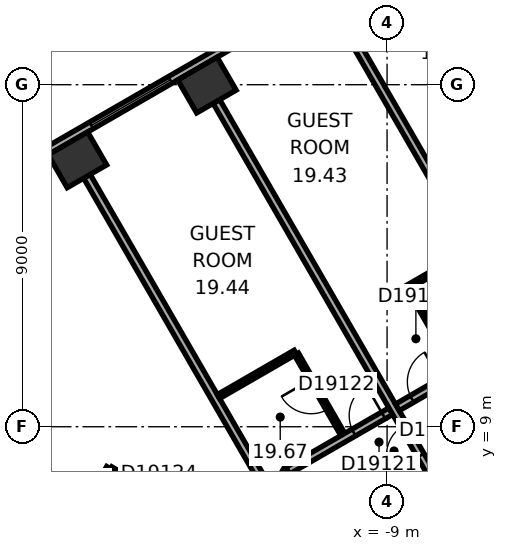
"""IFC4 building model, lengths in metres.
Left out: names, types, materials, properties, quantities, classifications, styles, units other than length and angle.
Written with IfcOpenShell. Run it as: python <this file> out.ifc"""

import sys

from ifc_helpers import new_model, si_unit, direction, frame, frame_2d, origin, origin_2d, place, context, subcontext, project, spatial, rectangle, extrude, element, fill, save


model = new_model("IFC4")
c1 = context("Model", 3, precision=1e-05, world=origin(), true_north=direction((0.0, 1.0)))
c2 = subcontext(c1, "Body", "Model", "MODEL_VIEW")
j1 = project(units=[si_unit("LENGTHUNIT", "METRE"), si_unit("PLANEANGLEUNIT", "RADIAN")], contexts=[c1])
p1 = place(None, origin())
s1 = spatial("IfcSite", under=j1, at=p1, CompositionType="ELEMENT")
p2 = place(p1, origin())
s2 = spatial("IfcBuilding", under=s1, at=p2, CompositionType="ELEMENT")
p3 = place(p2, frame((0.0, 0.0, 86.9)))
s3 = spatial("IfcBuildingStorey", under=s2, at=p3, CompositionType="ELEMENT", Elevation=86.9)
for number, where, z_axis, x_axis in (
    (1, (-13.74, 17.99, 0.0), (0.0, 0.0, 1.0), (-0.866, -0.5, 0.0)),
    (2, (-17.148, 16.023, 0.0), (0.0, 0.0, 1.0), (-0.866, -0.5, 0.0)),
):
    element("IfcColumn", number, at=place(p3, frame(where, z_axis=z_axis, x_axis=x_axis)), inside=s3, PredefinedType="COLUMN", context=c2, shape_type="SweptSolid", body=[
        extrude(rectangle(XDim=1.2, YDim=1.0, at=origin_2d()), origin(), (0.0, 0.0, 1.0), 3.3),
    ])
p4 = place(p3, frame((0.3, 11.836, 0.0), z_axis=(0.0, 0.0, 1.0), x_axis=(-0.866021384402, -0.500006961711, 0.0)))
e3 = element("IfcWall", 3, at=p4, inside=s3, PredefinedType="SHEAR", context=c2, shape_type="SweptSolid", body=[
    extrude(rectangle(XDim=12.355, YDim=1.2, at=frame_2d((6.178, 0.0))), origin(), (0.0, 0.0, 1.0), 3.3),
])
p5 = place(p4, frame((6.378, 0.0, 0.0)))
e4 = element("IfcOpeningElement", 4, at=p5, cuts=e3, PredefinedType="OPENING", context=c2, shape_type="SweptSolid", body=[
    extrude(rectangle(XDim=1.5, YDim=2.1, at=frame_2d((0.75, 1.05))), frame((0.0, 0.61, 0.0), z_axis=(0.0, -1.0, 0.0), x_axis=(1.0, 0.0, 0.0)), (0.0, 0.0, 1.0), 1.22),
])
p6 = place(p4, frame((1.828, 0.0, 0.0)))
e5 = element("IfcOpeningElement", 5, at=p6, cuts=e3, PredefinedType="OPENING", context=c2, shape_type="SweptSolid", body=[
    extrude(rectangle(XDim=1.1, YDim=2.1, at=frame_2d((0.55, 1.05))), frame((0.0, 0.61, 0.0), z_axis=(0.0, -1.0, 0.0), x_axis=(1.0, 0.0, 0.0)), (0.0, 0.0, 1.0), 1.22),
])
p7 = place(p3, frame((-3.136, 24.805, 0.0), z_axis=(0.0, 0.0, 1.0), x_axis=(-0.866028291626, -0.499994998079, 0.0)))
e6 = element("IfcWall", 6, at=p7, inside=s3, PredefinedType="STANDARD", context=c2, shape_type="SweptSolid", body=[
    extrude(rectangle(XDim=21.246, YDim=0.2, at=frame_2d((10.623, 0.0))), origin(), (0.0, 0.0, 1.0), 3.3),
])
p8 = place(p7, frame((1.555, 0.0, 0.8)))
e7 = element("IfcOpeningElement", 7, at=p8, cuts=e6, PredefinedType="OPENING", context=c2, shape_type="SweptSolid", body=[
    extrude(rectangle(XDim=2.4, YDim=1.7, at=frame_2d((1.2, 0.85))), frame((0.0, 0.11, 0.0), z_axis=(0.0, -1.0, 0.0), x_axis=(1.0, 0.0, 0.0)), (0.0, 0.0, 1.0), 0.22),
])
p9 = place(p7, frame((5.489, 0.0, 0.8)))
e8 = element("IfcOpeningElement", 8, at=p9, cuts=e6, PredefinedType="OPENING", context=c2, shape_type="SweptSolid", body=[
    extrude(rectangle(XDim=2.4, YDim=1.7, at=frame_2d((1.2, 0.85))), frame((0.0, 0.11, 0.0), z_axis=(0.0, -1.0, 0.0), x_axis=(1.0, 0.0, 0.0)), (0.0, 0.0, 1.0), 0.22),
])
p10 = place(p7, frame((9.424, 0.0, 0.8)))
e9 = element("IfcOpeningElement", 9, at=p10, cuts=e6, PredefinedType="OPENING", context=c2, shape_type="SweptSolid", body=[
    extrude(rectangle(XDim=2.4, YDim=1.7, at=frame_2d((1.2, 0.85))), frame((0.0, 0.11, 0.0), z_axis=(0.0, -1.0, 0.0), x_axis=(1.0, 0.0, 0.0)), (0.0, 0.0, 1.0), 0.22),
])
p11 = place(p7, frame((13.358, 0.0, 0.8)))
e10 = element("IfcOpeningElement", 10, at=p11, cuts=e6, PredefinedType="OPENING", context=c2, shape_type="SweptSolid", body=[
    extrude(rectangle(XDim=2.4, YDim=1.7, at=frame_2d((1.2, 0.85))), frame((0.0, 0.11, 0.0), z_axis=(0.0, -1.0, 0.0), x_axis=(1.0, 0.0, 0.0)), (0.0, 0.0, 1.0), 0.22),
])
p12 = place(p7, frame((17.293, 0.0, 0.8)))
e11 = element("IfcOpeningElement", 11, at=p12, cuts=e6, PredefinedType="OPENING", context=c2, shape_type="SweptSolid", body=[
    extrude(rectangle(XDim=2.4, YDim=1.7, at=frame_2d((1.2, 0.85))), frame((0.0, 0.11, 0.0), z_axis=(0.0, -1.0, 0.0), x_axis=(1.0, 0.0, 0.0)), (0.0, 0.0, 1.0), 0.22),
])
p13 = place(p3, frame((-17.426, 6.019, 0.0), z_axis=(0.0, 0.0, 1.0), x_axis=(0.50002983664, 0.866008176907, 0.0)))
e12 = element("IfcWall", 12, at=p13, inside=s3, PredefinedType="PARTITIONING", context=c2, shape_type="SweptSolid", body=[
    extrude(rectangle(XDim=2.2, YDim=0.12, at=frame_2d((1.1, 0.0))), origin(), (0.0, 0.0, 1.0), 3.05),
])
p14 = place(p3, frame((-16.898, 15.59, 0.0), z_axis=(0.0, 0.0, 1.0), x_axis=(0.499994742786, -0.866028439017, 0.0)))
e13 = element("IfcWall", 13, at=p14, inside=s3, PredefinedType="PARTITIONING", context=c2, shape_type="SweptSolid", body=[
    extrude(rectangle(XDim=9.65, YDim=0.2, at=frame_2d((4.825, 0.0))), origin(), (0.0, 0.0, 1.0), 3.05),
])
p15 = place(p3, frame((-16.274, 7.895, 0.0), z_axis=(0.0, 0.0, 1.0), x_axis=(0.865997131366, -0.500048966069, 0.0)))
e14 = element("IfcWall", 14, at=p15, inside=s3, PredefinedType="PARTITIONING", context=c2, shape_type="SweptSolid", body=[
    extrude(rectangle(XDim=2.74, YDim=0.12, at=frame_2d((1.37, 0.0))), origin(), (0.0, 0.0, 1.0), 3.05),
])
p16 = place(p15, frame((0.72, 0.0, 0.0)))
e15 = element("IfcOpeningElement", 15, at=p16, cuts=e14, PredefinedType="OPENING", context=c2, shape_type="SweptSolid", body=[
    extrude(rectangle(XDim=0.9, YDim=2.1, at=frame_2d((0.45, 1.05))), frame((0.0, 0.07, 0.0), z_axis=(0.0, -1.0, 0.0), x_axis=(1.0, 0.0, 0.0)), (0.0, 0.0, 1.0), 0.14),
])
p17 = place(p3, frame((-13.436, 9.794, 0.0), z_axis=(0.0, 0.0, 1.0), x_axis=(0.866053246676, 0.499951771596, 0.0)))
e16 = element("IfcWall", 16, at=p17, inside=s3, PredefinedType="PARTITIONING", context=c2, shape_type="SweptSolid", body=[
    extrude(rectangle(XDim=2.335, YDim=0.12, at=frame_2d((1.167, 0.0))), origin(), (0.0, 0.0, 1.0), 3.05),
])
p18 = place(p3, frame((-11.65, 7.823, 0.0), z_axis=(0.0, 0.0, 1.0), x_axis=(-0.50012165622, -0.865955154139, 0.0)))
e17 = element("IfcWall", 17, at=p18, inside=s3, PredefinedType="PARTITIONING", context=c2, shape_type="SweptSolid", body=[
    extrude(rectangle(XDim=0.6, YDim=0.2, at=frame_2d((0.3, 0.0))), origin(), (0.0, 0.0, 1.0), 3.05),
])
p19 = place(p3, frame((-11.385, 10.909, 0.0), z_axis=(0.0, 0.0, 1.0), x_axis=(0.500077547548, -0.865980627057, 0.0)))
e18 = element("IfcWall", 18, at=p19, inside=s3, PredefinedType="PARTITIONING", context=c2, shape_type="SweptSolid", body=[
    extrude(rectangle(XDim=2.44, YDim=0.12, at=frame_2d((1.22, 0.0))), origin(), (0.0, 0.0, 1.0), 3.05),
])
p20 = place(p19, frame((0.77, 0.0, 0.0)))
e19 = element("IfcOpeningElement", 19, at=p20, cuts=e18, PredefinedType="OPENING", context=c2, shape_type="SweptSolid", body=[
    extrude(rectangle(XDim=0.9, YDim=2.1, at=frame_2d((0.45, 1.05))), frame((0.0, 0.07, 0.0), z_axis=(0.0, -1.0, 0.0), x_axis=(1.0, 0.0, 0.0)), (0.0, 0.0, 1.0), 0.14),
])
p21 = place(p3, frame((-10.083, 19.524, 0.0), z_axis=(0.0, 0.0, 1.0), x_axis=(0.499999662836, -0.866025598446, 0.0)))
e20 = element("IfcWall", 20, at=p21, inside=s3, PredefinedType="PARTITIONING", context=c2, shape_type="SweptSolid", body=[
    extrude(rectangle(XDim=9.25, YDim=0.2, at=frame_2d((4.625, 0.0))), origin(), (0.0, 0.0, 1.0), 2.6),
])
p22 = place(p3, frame((-8.902, 9.41, 0.0), z_axis=(0.0, 0.0, 1.0), x_axis=(-0.866014299198, -0.500019233215, 0.0)))
e21 = element("IfcWall", 21, at=p22, inside=s3, PredefinedType="PARTITIONING", context=c2, shape_type="SweptSolid", body=[
    extrude(rectangle(XDim=3.133, YDim=0.2, at=frame_2d((1.567, 0.0))), origin(), (0.0, 0.0, 1.0), 3.05),
])
p23 = place(p22, frame((0.225, 0.0, 0.0)))
e22 = element("IfcOpeningElement", 22, at=p23, cuts=e21, PredefinedType="OPENING", context=c2, shape_type="SweptSolid", body=[
    extrude(rectangle(XDim=0.9, YDim=2.1, at=frame_2d((0.45, 1.05))), frame((0.0, 0.11, 0.0), z_axis=(0.0, -1.0, 0.0), x_axis=(1.0, 0.0, 0.0)), (0.0, 0.0, 1.0), 0.22),
])
p24 = place(p3, frame((-8.44, 12.679, 0.0), z_axis=(0.0, 0.0, 1.0), x_axis=(0.866044365799, 0.499967155389, 0.0)))
e23 = element("IfcWall", 23, at=p24, inside=s3, PredefinedType="PARTITIONING", context=c2, shape_type="SweptSolid", body=[
    extrude(rectangle(XDim=1.9, YDim=0.12, at=frame_2d((0.95, 0.0))), origin(), (0.0, 0.0, 1.0), 3.05),
])
p25 = place(p3, frame((-7.865, 7.814, 0.0), z_axis=(0.0, 0.0, 1.0), x_axis=(-0.500004234368, 0.866022959057, 0.0)))
e24 = element("IfcWall", 24, at=p25, inside=s3, PredefinedType="PARTITIONING", context=c2, shape_type="SweptSolid", body=[
    extrude(rectangle(XDim=11.25, YDim=0.2, at=frame_2d((5.625, 0.0))), origin(), (0.0, 0.0, 1.0), 3.05),
])
p26 = place(p25, frame((0.5, 0.0, 0.0)))
e25 = element("IfcOpeningElement", 25, at=p26, cuts=e24, PredefinedType="OPENING", context=c2, shape_type="SweptSolid", body=[
    extrude(rectangle(XDim=0.9, YDim=2.1, at=frame_2d((0.45, 1.05))), frame((0.0, 0.11, 0.0), z_axis=(0.0, -1.0, 0.0), x_axis=(1.0, 0.0, 0.0)), (0.0, 0.0, 1.0), 0.22),
])
p27 = place(p3, frame((-7.19, 10.513, 0.0), z_axis=(0.0, 0.0, 1.0), x_axis=(-0.499959183527, 0.866048967903, 0.0)))
e26 = element("IfcWall", 26, at=p27, inside=s3, PredefinedType="PARTITIONING", context=c2, shape_type="SweptSolid", body=[
    extrude(rectangle(XDim=2.44, YDim=0.12, at=frame_2d((1.22, 0.0))), origin(), (0.0, 0.0, 1.0), 3.05),
])
p28 = place(p27, frame((0.77, 0.0, 0.0)))
e27 = element("IfcOpeningElement", 27, at=p28, cuts=e26, PredefinedType="OPENING", context=c2, shape_type="SweptSolid", body=[
    extrude(rectangle(XDim=0.9, YDim=2.1, at=frame_2d((0.45, 1.05))), frame((0.0, 0.07, 0.0), z_axis=(0.0, -1.0, 0.0), x_axis=(1.0, 0.0, 0.0)), (0.0, 0.0, 1.0), 0.14),
])
p29 = place(p3, frame((-4.309, 12.061, 0.0), z_axis=(0.0, 0.0, 1.0), x_axis=(-0.866020679205, -0.500008183122, 0.0)))
e28 = element("IfcWall", 28, at=p29, inside=s3, PredefinedType="PARTITIONING", context=c2, shape_type="SweptSolid", body=[
    extrude(rectangle(XDim=5.104, YDim=0.2, at=frame_2d((2.552, 0.0))), origin(), (0.0, 0.0, 1.0), 3.05),
])
p30 = place(p29, frame((0.185, 0.0, 0.0)))
e29 = element("IfcOpeningElement", 29, at=p30, cuts=e28, PredefinedType="OPENING", context=c2, shape_type="SweptSolid", body=[
    extrude(rectangle(XDim=0.9, YDim=2.1, at=frame_2d((0.45, 1.05))), frame((0.0, 0.11, 0.0), z_axis=(0.0, -1.0, 0.0), x_axis=(1.0, 0.0, 0.0)), (0.0, 0.0, 1.0), 0.22),
])
p31 = place(p29, frame((3.761, 0.0, 0.0)))
e30 = element("IfcOpeningElement", 30, at=p31, cuts=e28, PredefinedType="OPENING", context=c2, shape_type="SweptSolid", body=[
    extrude(rectangle(XDim=0.9, YDim=2.1, at=frame_2d((0.45, 1.05))), frame((0.0, 0.11, 0.0), z_axis=(0.0, -1.0, 0.0), x_axis=(1.0, 0.0, 0.0)), (0.0, 0.0, 1.0), 0.22),
])
p32 = place(p11, origin())
e31 = element("IfcWindow", 31, at=p32, inside=s3, PartitioningType="SINGLE_PANEL", PredefinedType="WINDOW", context=c2, shape_type="SweptSolid", body=[
    extrude(rectangle(XDim=2.4, YDim=1.7, at=frame_2d((1.2, 0.85))), frame((0.0, 0.03, 0.0), z_axis=(0.0, -1.0, 0.0), x_axis=(1.0, 0.0, 0.0)), (0.0, 0.0, 1.0), 0.06),
])
fill(e10, e31)
p33 = place(p31, origin())
e32 = element("IfcDoor", 32, at=p33, inside=s3, OperationType="SINGLE_SWING_LEFT", PredefinedType="DOOR", context=c2, shape_type="SweptSolid", body=[
    extrude(rectangle(XDim=0.9, YDim=2.1, at=frame_2d((0.45, 1.05))), frame((0.0, 0.025, 0.0), z_axis=(0.0, -1.0, 0.0), x_axis=(1.0, 0.0, 0.0)), (0.0, 0.0, 1.0), 0.05),
])
fill(e30, e32)
p34 = place(p28, origin())
e33 = element("IfcDoor", 33, at=p34, inside=s3, OperationType="SINGLE_SWING_LEFT", PredefinedType="DOOR", context=c2, shape_type="SweptSolid", body=[
    extrude(rectangle(XDim=0.9, YDim=2.1, at=frame_2d((0.45, 1.05))), frame((0.0, 0.025, 0.0), z_axis=(0.0, -1.0, 0.0), x_axis=(1.0, 0.0, 0.0)), (0.0, 0.0, 1.0), 0.05),
])
fill(e27, e33)
p35 = place(p23, origin())
e34 = element("IfcDoor", 34, at=p35, inside=s3, OperationType="SINGLE_SWING_LEFT", PredefinedType="DOOR", context=c2, shape_type="SweptSolid", body=[
    extrude(rectangle(XDim=0.9, YDim=2.1, at=frame_2d((0.45, 1.05))), frame((0.0, 0.025, 0.0), z_axis=(0.0, -1.0, 0.0), x_axis=(1.0, 0.0, 0.0)), (0.0, 0.0, 1.0), 0.05),
])
fill(e22, e34)
p36 = place(p20, origin())
e35 = element("IfcDoor", 35, at=p36, inside=s3, OperationType="SINGLE_SWING_LEFT", PredefinedType="DOOR", context=c2, shape_type="SweptSolid", body=[
    extrude(rectangle(XDim=0.9, YDim=2.1, at=frame_2d((0.45, 1.05))), frame((0.0, 0.025, 0.0), z_axis=(0.0, -1.0, 0.0), x_axis=(1.0, 0.0, 0.0)), (0.0, 0.0, 1.0), 0.05),
])
fill(e19, e35)
p37 = place(p26, origin())
e36 = element("IfcDoor", 36, at=p37, inside=s3, OperationType="SINGLE_SWING_LEFT", PredefinedType="DOOR", context=c2, shape_type="SweptSolid", body=[
    extrude(rectangle(XDim=0.9, YDim=2.1, at=frame_2d((0.45, 1.05))), frame((0.0, 0.025, 0.0), z_axis=(0.0, -1.0, 0.0), x_axis=(1.0, 0.0, 0.0)), (0.0, 0.0, 1.0), 0.05),
])
fill(e25, e36)
save(model, sys.argv[1])
